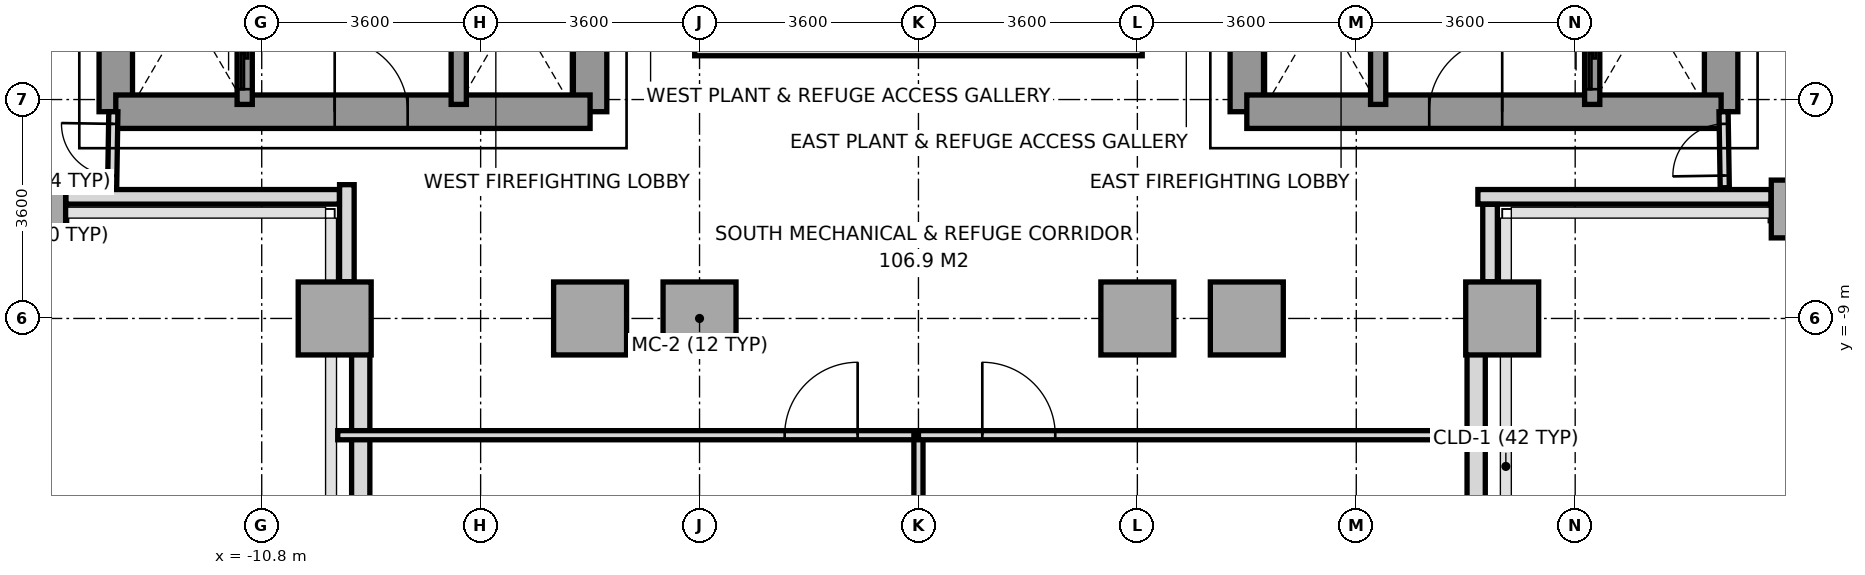
"""IFC4 building model, lengths in metres.
Left out: names, types, materials, properties, quantities, classifications, styles, units other than length and angle.
Written with IfcOpenShell. Run it as: python <this file> out.ifc"""

import sys

from ifc_helpers import new_model, si_unit, direction, frame, frame_2d, origin, origin_2d, place, context, subcontext, project, spatial, rectangle, extrude, source, transform, mapped, element, fill, save


model = new_model("IFC4")
c1 = context("Model", 3, precision=1e-05, world=origin(), true_north=direction((0.0, 1.0)))
c2 = subcontext(c1, "Body", "Model", "MODEL_VIEW")
j1 = project(units=[si_unit("LENGTHUNIT", "METRE"), si_unit("PLANEANGLEUNIT", "RADIAN")], contexts=[c1])
p1 = place(None, origin())
s1 = spatial("IfcSite", under=j1, at=p1, CompositionType="ELEMENT")
p2 = place(p1, origin())
s2 = spatial("IfcBuilding", under=s1, at=p2, CompositionType="ELEMENT")
p3 = place(p2, frame((0.0, 0.0, 88.4)))
s3 = spatial("IfcBuildingStorey", under=s2, at=p3, CompositionType="ELEMENT", Elevation=88.4)
m1 = source(origin(), c2, "Body", "SweptSolid", [
    extrude(rectangle(XDim=0.75, YDim=0.95, at=origin_2d()), origin(), (0.0, 0.0, 1.0), 4.4),
])
p4 = place(p3, frame((-14.4, -7.2, 0.0), z_axis=(0.0, 0.0, 1.0), x_axis=(1.0, 0.0, 0.0)))
e1 = element("IfcColumn", 1, at=p4, inside=s3, PredefinedType="COLUMN", context=c2, shape_type="MappedRepresentation", body=[
    mapped(m1, transform((0.0, 0.0, 0.0), x_axis=(1.0, 0.0, 0.0), y_axis=(0.0, 1.0, 0.0), z_axis=(0.0, 0.0, 1.0), scale=1.0)),
])
m2 = source(origin(), c2, "Body", "SweptSolid", [
    extrude(rectangle(XDim=1.2, YDim=1.2, at=origin_2d()), origin(), (0.0, 0.0, 1.0), 4.4),
])
for number, where, z_axis, x_axis in (
    (2, (-9.6, -9.0, 0.0), (0.0, 0.0, 1.0), (1.0, 0.0, 0.0)),
    (3, (-5.4, -9.0, 0.0), (0.0, 0.0, 1.0), (1.0, 0.0, 0.0)),
    (4, (-3.6, -9.0, 0.0), (0.0, 0.0, 1.0), (1.0, 0.0, 0.0)),
    (5, (3.6, -9.0, 0.0), (0.0, 0.0, 1.0), (1.0, 0.0, 0.0)),
    (6, (5.4, -9.0, 0.0), (0.0, 0.0, 1.0), (1.0, 0.0, 0.0)),
    (7, (9.6, -9.0, 0.0), (0.0, 0.0, 1.0), (1.0, 0.0, 0.0)),
):
    element("IfcColumn", number, at=place(p3, frame(where, z_axis=z_axis, x_axis=x_axis)), inside=s3, PredefinedType="COLUMN", context=c2, shape_type="MappedRepresentation", body=[
        mapped(m2, transform((0.0, 0.0, 0.0), x_axis=(1.0, 0.0, 0.0), y_axis=(0.0, 1.0, 0.0), z_axis=(0.0, 0.0, 1.0), scale=1.0)),
    ])
p5 = place(p3, frame((14.4, -7.2, 0.0), z_axis=(0.0, 0.0, 1.0), x_axis=(1.0, 0.0, 0.0)))
e8 = element("IfcColumn", 8, at=p5, inside=s3, PredefinedType="COLUMN", context=c2, shape_type="MappedRepresentation", body=[
    mapped(m1, transform((0.0, 0.0, 0.0), x_axis=(1.0, 0.0, 0.0), y_axis=(0.0, 1.0, 0.0), z_axis=(0.0, 0.0, 1.0), scale=1.0)),
])
for number, where, z_axis, x_axis in (
    (9, (-9.172, -9.568, 0.0), (0.0, 0.0, 1.0), (0.0, -1.0, 0.0)),
    (10, (9.172, -15.63, 0.0), (0.0, 0.0, 1.0), (0.0, 1.0, 0.0)),
):
    element("IfcWall", number, at=place(p3, frame(where, z_axis=z_axis, x_axis=x_axis)), inside=s3, PredefinedType="SOLIDWALL", context=c2, shape_type="SweptSolid", body=[
        extrude(rectangle(XDim=6.062, YDim=0.3, at=frame_2d((3.031, 0.0))), origin(), (0.0, 0.0, 1.0), 4.4),
    ])
p6 = place(p3, frame((14.022, -7.0, 0.0), z_axis=(0.0, 0.0, 1.0), x_axis=(-1.0, 0.0, 0.0)))
e11 = element("IfcWall", 11, at=p6, inside=s3, PredefinedType="PARAPET", context=c2, shape_type="SweptSolid", body=[
    extrude(rectangle(XDim=4.822, YDim=0.24, at=frame_2d((2.411, 0.0))), origin(), (0.0, 0.0, 1.0), 1.15),
])
p7 = place(p3, frame((9.4, -7.123, 0.0), z_axis=(0.0, 0.0, 1.0), x_axis=(0.0, -1.0, 0.0)))
e12 = element("IfcWall", 12, at=p7, inside=s3, PredefinedType="PARAPET", context=c2, shape_type="SweptSolid", body=[
    extrude(rectangle(XDim=1.274, YDim=0.24, at=frame_2d((0.637, 0.0))), origin(), (0.0, 0.0, 1.0), 1.15),
])
p8 = place(p3, frame((-9.4, -8.397, 0.0), z_axis=(0.0, 0.0, 1.0), x_axis=(0.0, 1.0, 0.0)))
e13 = element("IfcWall", 13, at=p8, inside=s3, PredefinedType="PARAPET", context=c2, shape_type="SweptSolid", body=[
    extrude(rectangle(XDim=1.597, YDim=0.24, at=frame_2d((0.798, 0.0))), origin(), (0.0, 0.0, 1.0), 1.15),
])
p9 = place(p3, frame((-9.523, -7.0, 0.0), z_axis=(0.0, 0.0, 1.0), x_axis=(-1.0, 0.0, 0.0)))
e14 = element("IfcWall", 14, at=p9, inside=s3, PredefinedType="PARAPET", context=c2, shape_type="SweptSolid", body=[
    extrude(rectangle(XDim=4.499, YDim=0.24, at=frame_2d((2.25, 0.0))), origin(), (0.0, 0.0, 1.0), 1.15),
])
p10 = place(p3, frame((-13.2, -5.6, 0.0), z_axis=(0.0, 0.0, 1.0), x_axis=(0.0, 1.0, 0.0)))
e15 = element("IfcWall", 15, at=p10, inside=s3, PredefinedType="SHEAR", context=c2, shape_type="SweptSolid", body=[
    extrude(rectangle(XDim=11.2, YDim=0.55, at=frame_2d((5.6, 0.0))), origin(), (0.0, 0.0, 1.0), 4.4),
])
p11 = place(p3, frame((-5.4, -5.6, 0.0), z_axis=(0.0, 0.0, 1.0), x_axis=(0.0, 1.0, 0.0)))
e16 = element("IfcWall", 16, at=p11, inside=s3, PredefinedType="SHEAR", context=c2, shape_type="SweptSolid", body=[
    extrude(rectangle(XDim=12.5, YDim=0.55, at=frame_2d((6.25, 0.0))), origin(), (0.0, 0.0, 1.0), 4.4),
])
p12 = place(p11, frame((4.55, 0.0, 0.0)))
e17 = element("IfcOpeningElement", 17, at=p12, cuts=e16, PredefinedType="OPENING", context=c2, shape_type="SweptSolid", body=[
    extrude(rectangle(XDim=1.2, YDim=2.2, at=frame_2d((0.6, 1.1))), frame((0.0, 0.285, 0.0), z_axis=(0.0, -1.0, 0.0), x_axis=(1.0, 0.0, 0.0)), (0.0, 0.0, 1.0), 0.57),
])
p13 = place(p11, frame((6.86, 0.0, 0.0)))
e18 = element("IfcOpeningElement", 18, at=p13, cuts=e16, PredefinedType="OPENING", context=c2, shape_type="SweptSolid", body=[
    extrude(rectangle(XDim=0.8, YDim=2.1, at=frame_2d((0.4, 1.05))), frame((0.0, 0.285, 0.0), z_axis=(0.0, -1.0, 0.0), x_axis=(1.0, 0.0, 0.0)), (0.0, 0.0, 1.0), 0.57),
])
p14 = place(p3, frame((-13.2, -5.6, 0.0), z_axis=(0.0, 0.0, 1.0), x_axis=(1.0, 0.0, 0.0)))
e19 = element("IfcWall", 19, at=p14, inside=s3, PredefinedType="SHEAR", context=c2, shape_type="SweptSolid", body=[
    extrude(rectangle(XDim=7.8, YDim=0.55, at=frame_2d((3.9, 0.0))), origin(), (0.0, 0.0, 1.0), 4.4),
])
p15 = place(p14, frame((3.6, 0.0, 0.0)))
e20 = element("IfcOpeningElement", 20, at=p15, cuts=e19, PredefinedType="OPENING", context=c2, shape_type="SweptSolid", body=[
    extrude(rectangle(XDim=1.2, YDim=2.2, at=frame_2d((0.6, 1.1))), frame((0.0, 0.285, 0.0), z_axis=(0.0, -1.0, 0.0), x_axis=(1.0, 0.0, 0.0)), (0.0, 0.0, 1.0), 0.57),
])
p16 = place(p3, frame((13.2, -5.6, 0.0), z_axis=(0.0, 0.0, 1.0), x_axis=(0.0, 1.0, 0.0)))
e21 = element("IfcWall", 21, at=p16, inside=s3, PredefinedType="SHEAR", context=c2, shape_type="SweptSolid", body=[
    extrude(rectangle(XDim=11.2, YDim=0.55, at=frame_2d((5.6, 0.0))), origin(), (0.0, 0.0, 1.0), 4.4),
])
p17 = place(p3, frame((5.4, -5.6, 0.0), z_axis=(0.0, 0.0, 1.0), x_axis=(0.0, 1.0, 0.0)))
e22 = element("IfcWall", 22, at=p17, inside=s3, PredefinedType="SHEAR", context=c2, shape_type="SweptSolid", body=[
    extrude(rectangle(XDim=12.5, YDim=0.55, at=frame_2d((6.25, 0.0))), origin(), (0.0, 0.0, 1.0), 4.4),
])
p18 = place(p17, frame((4.55, 0.0, 0.0)))
e23 = element("IfcOpeningElement", 23, at=p18, cuts=e22, PredefinedType="OPENING", context=c2, shape_type="SweptSolid", body=[
    extrude(rectangle(XDim=1.2, YDim=2.2, at=frame_2d((0.6, 1.1))), frame((0.0, 0.285, 0.0), z_axis=(0.0, -1.0, 0.0), x_axis=(1.0, 0.0, 0.0)), (0.0, 0.0, 1.0), 0.57),
])
p19 = place(p17, frame((6.86, 0.0, 0.0)))
e24 = element("IfcOpeningElement", 24, at=p19, cuts=e22, PredefinedType="OPENING", context=c2, shape_type="SweptSolid", body=[
    extrude(rectangle(XDim=0.8, YDim=2.1, at=frame_2d((0.4, 1.05))), frame((0.0, 0.285, 0.0), z_axis=(0.0, -1.0, 0.0), x_axis=(1.0, 0.0, 0.0)), (0.0, 0.0, 1.0), 0.57),
])
p20 = place(p3, frame((5.4, -5.6, 0.0), z_axis=(0.0, 0.0, 1.0), x_axis=(1.0, 0.0, 0.0)))
e25 = element("IfcWall", 25, at=p20, inside=s3, PredefinedType="SHEAR", context=c2, shape_type="SweptSolid", body=[
    extrude(rectangle(XDim=7.8, YDim=0.55, at=frame_2d((3.9, 0.0))), origin(), (0.0, 0.0, 1.0), 4.4),
])
p21 = place(p20, frame((3.0, 0.0, 0.0)))
e26 = element("IfcOpeningElement", 26, at=p21, cuts=e25, PredefinedType="OPENING", context=c2, shape_type="SweptSolid", body=[
    extrude(rectangle(XDim=1.2, YDim=2.2, at=frame_2d((0.6, 1.1))), frame((0.0, 0.285, 0.0), z_axis=(0.0, -1.0, 0.0), x_axis=(1.0, 0.0, 0.0)), (0.0, 0.0, 1.0), 0.57),
])
p22 = place(p3, frame((-11.08, -5.48, 0.0), z_axis=(0.0, 0.0, 1.0), x_axis=(0.0, 1.0, 0.0)))
e27 = element("IfcWall", 27, at=p22, inside=s3, PredefinedType="SOLIDWALL", context=c2, shape_type="SweptSolid", body=[
    extrude(rectangle(XDim=1.6, YDim=0.25, at=frame_2d((0.8, 0.0))), origin(), (0.0, 0.0, 1.0), 4.4),
])
p23 = place(p22, frame((0.25, 0.0, 0.0)))
e28 = element("IfcOpeningElement", 28, at=p23, cuts=e27, PredefinedType="OPENING", context=c2, shape_type="SweptSolid", body=[
    extrude(rectangle(XDim=1.1, YDim=2.2, at=frame_2d((0.55, 1.1))), frame((0.0, 0.135, 0.0), z_axis=(0.0, -1.0, 0.0), x_axis=(1.0, 0.0, 0.0)), (0.0, 0.0, 1.0), 0.27),
])
p24 = place(p3, frame((11.08, -5.48, 0.0), z_axis=(0.0, 0.0, 1.0), x_axis=(0.0, 1.0, 0.0)))
e29 = element("IfcWall", 29, at=p24, inside=s3, PredefinedType="SOLIDWALL", context=c2, shape_type="SweptSolid", body=[
    extrude(rectangle(XDim=1.6, YDim=0.25, at=frame_2d((0.8, 0.0))), origin(), (0.0, 0.0, 1.0), 4.4),
])
p25 = place(p24, frame((0.25, 0.0, 0.0)))
e30 = element("IfcOpeningElement", 30, at=p25, cuts=e29, PredefinedType="OPENING", context=c2, shape_type="SweptSolid", body=[
    extrude(rectangle(XDim=1.1, YDim=2.2, at=frame_2d((0.55, 1.1))), frame((0.0, 0.135, 0.0), z_axis=(0.0, -1.0, 0.0), x_axis=(1.0, 0.0, 0.0)), (0.0, 0.0, 1.0), 0.27),
])
for number, where, z_axis, x_axis in (
    (31, (-7.56, -5.48, 0.0), (0.0, 0.0, 1.0), (0.0, 1.0, 0.0)),
    (32, (7.56, -5.48, 0.0), (0.0, 0.0, 1.0), (0.0, 1.0, 0.0)),
):
    element("IfcWall", number, at=place(p3, frame(where, z_axis=z_axis, x_axis=x_axis)), inside=s3, PredefinedType="SOLIDWALL", context=c2, shape_type="SweptSolid", body=[
        extrude(rectangle(XDim=1.6, YDim=0.25, at=frame_2d((0.8, 0.0))), origin(), (0.0, 0.0, 1.0), 4.4),
    ])
p26 = place(p3, frame((-13.26, -6.85, 0.0), z_axis=(0.0, 0.0, 1.0), x_axis=(0.016013571389, 0.999871774545, 0.0)))
e33 = element("IfcWall", 33, at=p26, inside=s3, PredefinedType="PARTITIONING", context=c2, shape_type="SweptSolid", body=[
    extrude(rectangle(XDim=1.25, YDim=0.15, at=frame_2d((0.625, 0.0))), origin(), (0.0, 0.0, 1.0), 4.4),
])
p27 = place(p26, frame((0.2, 0.0, 0.0)))
e34 = element("IfcOpeningElement", 34, at=p27, cuts=e33, PredefinedType="OPENING", context=c2, shape_type="SweptSolid", body=[
    extrude(rectangle(XDim=0.85, YDim=2.1, at=frame_2d((0.425, 1.05))), frame((0.0, 0.085, 0.0), z_axis=(0.0, -1.0, 0.0), x_axis=(1.0, 0.0, 0.0)), (0.0, 0.0, 1.0), 0.17),
])
p28 = place(p3, frame((13.26, -6.85, 0.0), z_axis=(0.0, 0.0, 1.0), x_axis=(-0.016013571389, 0.999871774545, 0.0)))
e35 = element("IfcWall", 35, at=p28, inside=s3, PredefinedType="PARTITIONING", context=c2, shape_type="SweptSolid", body=[
    extrude(rectangle(XDim=1.25, YDim=0.15, at=frame_2d((0.625, 0.0))), origin(), (0.0, 0.0, 1.0), 4.4),
])
p29 = place(p28, frame((0.2, 0.0, 0.0)))
e36 = element("IfcOpeningElement", 36, at=p29, cuts=e35, PredefinedType="OPENING", context=c2, shape_type="SweptSolid", body=[
    extrude(rectangle(XDim=0.85, YDim=2.1, at=frame_2d((0.425, 1.05))), frame((0.0, 0.085, 0.0), z_axis=(0.0, -1.0, 0.0), x_axis=(1.0, 0.0, 0.0)), (0.0, 0.0, 1.0), 0.17),
])
p30 = place(p3, frame((-9.55, -10.92, 0.0), z_axis=(0.0, 0.0, 1.0), x_axis=(1.0, 0.0, 0.0)))
e37 = element("IfcWall", 37, at=p30, inside=s3, PredefinedType="PARTITIONING", context=c2, shape_type="SweptSolid", body=[
    extrude(rectangle(XDim=9.55, YDim=0.15, at=frame_2d((4.775, 0.0))), origin(), (0.0, 0.0, 1.0), 4.4),
])
p31 = place(p30, frame((7.35, 0.0, 0.0)))
e38 = element("IfcOpeningElement", 38, at=p31, cuts=e37, PredefinedType="OPENING", context=c2, shape_type="SweptSolid", body=[
    extrude(rectangle(XDim=1.2, YDim=2.2, at=frame_2d((0.6, 1.1))), frame((0.0, 0.085, 0.0), z_axis=(0.0, -1.0, 0.0), x_axis=(1.0, 0.0, 0.0)), (0.0, 0.0, 1.0), 0.17),
])
p32 = place(p3, frame((0.0, -24.65, 0.0), z_axis=(0.0, 0.0, 1.0), x_axis=(0.0, 1.0, 0.0)))
e39 = element("IfcWall", 39, at=p32, inside=s3, PredefinedType="PARTITIONING", context=c2, shape_type="SweptSolid", body=[
    extrude(rectangle(XDim=13.73, YDim=0.15, at=frame_2d((6.865, 0.0))), origin(), (0.0, 0.0, 1.0), 3.9),
])
p33 = place(p3, frame((0.0, -10.92, 0.0), z_axis=(0.0, 0.0, 1.0), x_axis=(1.0, 0.0, 0.0)))
e40 = element("IfcWall", 40, at=p33, inside=s3, PredefinedType="PARTITIONING", context=c2, shape_type="SweptSolid", body=[
    extrude(rectangle(XDim=9.55, YDim=0.15, at=frame_2d((4.775, 0.0))), origin(), (0.0, 0.0, 1.0), 4.4),
])
p34 = place(p33, frame((1.05, 0.0, 0.0)))
e41 = element("IfcOpeningElement", 41, at=p34, cuts=e40, PredefinedType="OPENING", context=c2, shape_type="SweptSolid", body=[
    extrude(rectangle(XDim=1.2, YDim=2.2, at=frame_2d((0.6, 1.1))), frame((0.0, 0.085, 0.0), z_axis=(0.0, -1.0, 0.0), x_axis=(1.0, 0.0, 0.0)), (0.0, 0.0, 1.0), 0.17),
])
p35 = place(p3, frame((-3.68, -4.56, 0.0), z_axis=(0.0, 0.0, 1.0), x_axis=(1.0, 0.0, 0.0)))
e42 = element("IfcWall", 42, at=p35, inside=s3, PredefinedType="PARAPET", context=c2, shape_type="SweptSolid", body=[
    extrude(rectangle(XDim=7.36, YDim=0.24, at=frame_2d((3.68, 0.0))), origin(), (0.0, 0.0, 1.0), 1.15),
])
m3 = source(origin(), c2, "Body", "SweptSolid", [
    extrude(rectangle(XDim=1.2, YDim=2.2, at=frame_2d((0.6, 1.1))), frame((0.0, 0.025, 0.0), z_axis=(0.0, -1.0, 0.0), x_axis=(1.0, 0.0, 0.0)), (0.0, 0.0, 1.0), 0.05),
])
p36 = place(p15, origin())
e43 = element("IfcDoor", 43, at=p36, inside=s3, OperationType="SINGLE_SWING_LEFT", PredefinedType="DOOR", context=c2, shape_type="MappedRepresentation", body=[
    mapped(m3, transform((0.0, 0.0, 0.0), x_axis=(1.0, 0.0, 0.0), y_axis=(0.0, 1.0, 0.0), z_axis=(0.0, 0.0, 1.0), scale=1.0)),
])
fill(e20, e43)
p37 = place(p21, origin())
e44 = element("IfcDoor", 44, at=p37, inside=s3, OperationType="SINGLE_SWING_RIGHT", PredefinedType="DOOR", context=c2, shape_type="MappedRepresentation", body=[
    mapped(m3, transform((0.0, 0.0, 0.0), x_axis=(1.0, 0.0, 0.0), y_axis=(0.0, 1.0, 0.0), z_axis=(0.0, 0.0, 1.0), scale=1.0)),
])
fill(e26, e44)
m4 = source(origin(), c2, "Body", "SweptSolid", [
    extrude(rectangle(XDim=1.1, YDim=2.2, at=frame_2d((0.55, 1.1))), frame((0.0, 0.025, 0.0), z_axis=(0.0, -1.0, 0.0), x_axis=(1.0, 0.0, 0.0)), (0.0, 0.0, 1.0), 0.05),
])
p38 = place(p23, origin())
e45 = element("IfcDoor", 45, at=p38, inside=s3, OperationType="SLIDING_TO_LEFT", PredefinedType="DOOR", context=c2, shape_type="MappedRepresentation", body=[
    mapped(m4, transform((0.0, 0.0, 0.0), x_axis=(1.0, 0.0, 0.0), y_axis=(0.0, 1.0, 0.0), z_axis=(0.0, 0.0, 1.0), scale=1.0)),
])
fill(e28, e45)
p39 = place(p25, origin())
e46 = element("IfcDoor", 46, at=p39, inside=s3, OperationType="SLIDING_TO_LEFT", PredefinedType="DOOR", context=c2, shape_type="MappedRepresentation", body=[
    mapped(m4, transform((0.0, 0.0, 0.0), x_axis=(1.0, 0.0, 0.0), y_axis=(0.0, 1.0, 0.0), z_axis=(0.0, 0.0, 1.0), scale=1.0)),
])
fill(e30, e46)
m5 = source(origin(), c2, "Body", "SweptSolid", [
    extrude(rectangle(XDim=0.85, YDim=2.1, at=frame_2d((0.425, 1.05))), frame((0.0, 0.025, 0.0), z_axis=(0.0, -1.0, 0.0), x_axis=(1.0, 0.0, 0.0)), (0.0, 0.0, 1.0), 0.05),
])
p40 = place(p27, origin())
e47 = element("IfcDoor", 47, at=p40, inside=s3, OperationType="SINGLE_SWING_RIGHT", PredefinedType="DOOR", context=c2, shape_type="MappedRepresentation", body=[
    mapped(m5, transform((0.0, 0.0, 0.0), x_axis=(1.0, 0.0, 0.0), y_axis=(0.0, 1.0, 0.0), z_axis=(0.0, 0.0, 1.0), scale=1.0)),
])
fill(e34, e47)
p41 = place(p29, origin())
e48 = element("IfcDoor", 48, at=p41, inside=s3, OperationType="SINGLE_SWING_LEFT", PredefinedType="DOOR", context=c2, shape_type="MappedRepresentation", body=[
    mapped(m5, transform((0.0, 0.0, 0.0), x_axis=(1.0, 0.0, 0.0), y_axis=(0.0, 1.0, 0.0), z_axis=(0.0, 0.0, 1.0), scale=1.0)),
])
fill(e36, e48)
p42 = place(p31, origin())
e49 = element("IfcDoor", 49, at=p42, inside=s3, OperationType="SINGLE_SWING_RIGHT", PredefinedType="DOOR", context=c2, shape_type="MappedRepresentation", body=[
    mapped(m3, transform((0.0, 0.0, 0.0), x_axis=(1.0, 0.0, 0.0), y_axis=(0.0, 1.0, 0.0), z_axis=(0.0, 0.0, 1.0), scale=1.0)),
])
fill(e38, e49)
p43 = place(p34, origin())
e50 = element("IfcDoor", 50, at=p43, inside=s3, OperationType="SINGLE_SWING_LEFT", PredefinedType="DOOR", context=c2, shape_type="MappedRepresentation", body=[
    mapped(m3, transform((0.0, 0.0, 0.0), x_axis=(1.0, 0.0, 0.0), y_axis=(0.0, 1.0, 0.0), z_axis=(0.0, 0.0, 1.0), scale=1.0)),
])
fill(e41, e50)
save(model, sys.argv[1])
